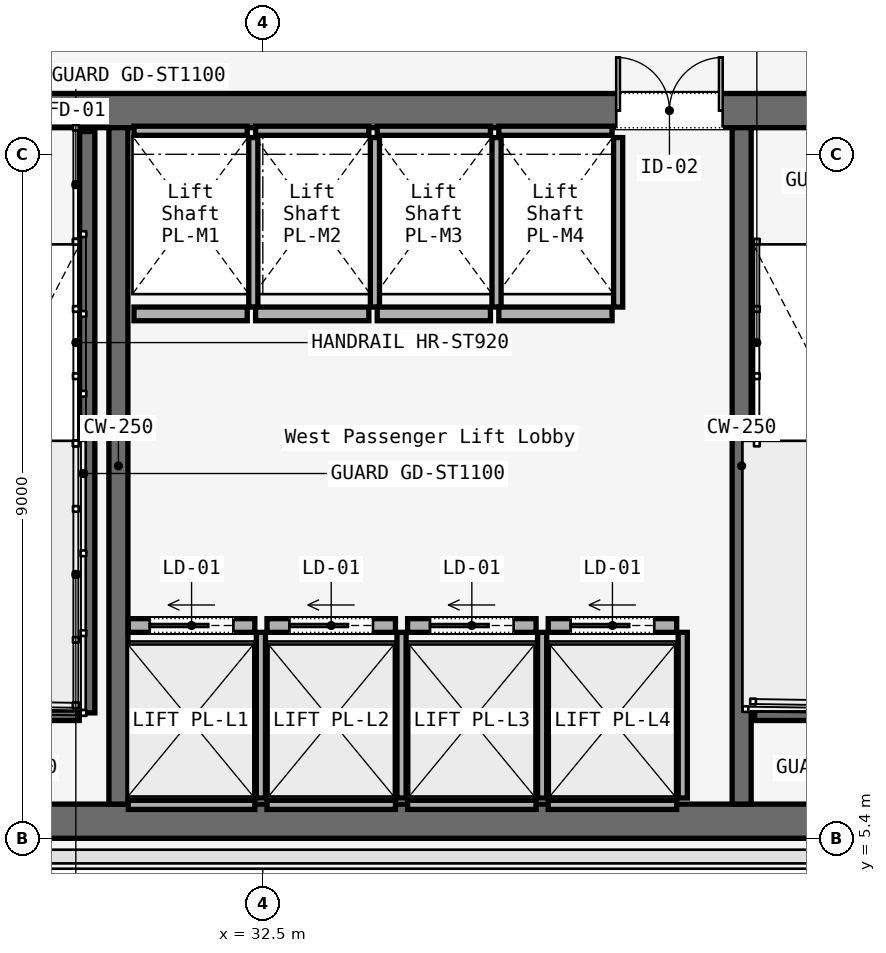
"""IFC4 building model, lengths in metres.
Left out: names, types, materials, properties, quantities, classifications, styles, units other than length and angle.
Written with IfcOpenShell. Run it as: python <this file> out.ifc"""

import sys

from ifc_helpers import new_model, si_unit, direction, frame, frame_2d, origin, place, context, subcontext, project, spatial, rectangle, extrude, element, fill, save


model = new_model("IFC4")
c1 = context("Model", 3, precision=1e-05, world=origin(), true_north=direction((0.0, 1.0)))
c2 = subcontext(c1, "Body", "Model", "MODEL_VIEW")
j1 = project(units=[si_unit("LENGTHUNIT", "METRE"), si_unit("PLANEANGLEUNIT", "RADIAN")], contexts=[c1])
p1 = place(None, origin())
s1 = spatial("IfcSite", under=j1, at=p1, CompositionType="ELEMENT")
p2 = place(p1, origin())
s2 = spatial("IfcBuilding", under=s1, at=p2, CompositionType="ELEMENT")
p3 = place(p2, frame((0.0, 0.0, 81.6)))
s3 = spatial("IfcBuildingStorey", under=s2, at=p3, CompositionType="ELEMENT", Elevation=81.6)
p4 = place(p3, frame((26.45, 14.975, 0.0), z_axis=(0.0, 0.0, 1.0), x_axis=(1.0, 0.0, 0.0)))
e1 = element("IfcWall", 1, at=p4, inside=s3, PredefinedType="SOLIDWALL", context=c2, shape_type="SweptSolid", body=[
    extrude(rectangle(XDim=31.1, YDim=0.45, at=frame_2d((15.55, 0.0))), origin(), (0.0, 0.0, 1.0), 3.58),
])
p5 = place(p4, frame((1.65, 0.0, 0.0)))
e2 = element("IfcOpeningElement", 2, at=p5, cuts=e1, PredefinedType="OPENING", context=c2, shape_type="SweptSolid", body=[
    extrude(rectangle(XDim=1.1, YDim=2.2, at=frame_2d((0.55, 1.1))), frame((0.0, 0.225, 0.0), z_axis=(0.0, -1.0, 0.0), x_axis=(1.0, 0.0, 0.0)), (0.0, 0.0, 1.0), 0.45),
])
p6 = place(p4, frame((13.65, 0.0, 0.0)))
e3 = element("IfcOpeningElement", 3, at=p6, cuts=e1, PredefinedType="OPENING", context=c2, shape_type="SweptSolid", body=[
    extrude(rectangle(XDim=1.1, YDim=2.2, at=frame_2d((0.55, 1.1))), frame((0.0, 0.225, 0.0), z_axis=(0.0, -1.0, 0.0), x_axis=(1.0, 0.0, 0.0)), (0.0, 0.0, 1.0), 0.45),
])
p7 = place(p4, frame((25.55, 0.0, 0.0)))
e4 = element("IfcOpeningElement", 4, at=p7, cuts=e1, PredefinedType="OPENING", context=c2, shape_type="SweptSolid", body=[
    extrude(rectangle(XDim=1.1, YDim=2.2, at=frame_2d((0.55, 1.1))), frame((0.0, 0.225, 0.0), z_axis=(0.0, -1.0, 0.0), x_axis=(1.0, 0.0, 0.0)), (0.0, 0.0, 1.0), 0.45),
])
p8 = place(p4, frame((10.7, 0.0, 0.0)))
e5 = element("IfcOpeningElement", 5, at=p8, cuts=e1, PredefinedType="OPENING", context=c2, shape_type="SweptSolid", body=[
    extrude(rectangle(XDim=1.4, YDim=2.2, at=frame_2d((0.7, 1.1))), frame((0.0, 0.225, 0.0), z_axis=(0.0, -1.0, 0.0), x_axis=(1.0, 0.0, 0.0)), (0.0, 0.0, 1.0), 0.45),
])
p9 = place(p4, frame((19.35, 0.0, 0.0)))
e6 = element("IfcOpeningElement", 6, at=p9, cuts=e1, PredefinedType="OPENING", context=c2, shape_type="SweptSolid", body=[
    extrude(rectangle(XDim=1.1, YDim=2.2, at=frame_2d((0.55, 1.1))), frame((0.0, 0.225, 0.0), z_axis=(0.0, -1.0, 0.0), x_axis=(1.0, 0.0, 0.0)), (0.0, 0.0, 1.0), 0.45),
])
p10 = place(p4, frame((21.4, 0.0, 0.0)))
e7 = element("IfcOpeningElement", 7, at=p10, cuts=e1, PredefinedType="OPENING", context=c2, shape_type="SweptSolid", body=[
    extrude(rectangle(XDim=0.9, YDim=2.1, at=frame_2d((0.45, 1.05))), frame((0.0, 0.225, 0.0), z_axis=(0.0, -1.0, 0.0), x_axis=(1.0, 0.0, 0.0)), (0.0, 0.0, 1.0), 0.45),
])
p11 = place(p4, frame((23.35, 0.0, 0.0)))
e8 = element("IfcOpeningElement", 8, at=p11, cuts=e1, PredefinedType="OPENING", context=c2, shape_type="SweptSolid", body=[
    extrude(rectangle(XDim=1.3, YDim=2.3, at=frame_2d((0.65, 1.15))), frame((0.0, 0.225, 0.0), z_axis=(0.0, -1.0, 0.0), x_axis=(1.0, 0.0, 0.0)), (0.0, 0.0, 1.0), 0.45),
])
p12 = place(p3, frame((26.45, 5.625, 0.0), z_axis=(0.0, 0.0, 1.0), x_axis=(1.0, 0.0, 0.0)))
e9 = element("IfcWall", 9, at=p12, inside=s3, PredefinedType="SOLIDWALL", context=c2, shape_type="SweptSolid", body=[
    extrude(rectangle(XDim=31.1, YDim=0.45, at=frame_2d((15.55, 0.0))), origin(), (0.0, 0.0, 1.0), 3.58),
])
for number, where, z_axis, x_axis in (
    (10, (30.6, 5.85, 0.0), (0.0, 0.0, 1.0), (0.0, 1.0, 0.0)),
    (11, (38.8, 5.85, 0.0), (0.0, 0.0, 1.0), (0.0, 1.0, 0.0)),
):
    element("IfcWall", number, at=place(p3, frame(where, z_axis=z_axis, x_axis=x_axis)), inside=s3, PredefinedType="SOLIDWALL", context=c2, shape_type="SweptSolid", body=[
        extrude(rectangle(XDim=8.9, YDim=0.25, at=frame_2d((4.45, 0.0))), origin(), (0.0, 0.0, 1.0), 3.58),
    ])
p13 = place(p3, frame((30.19, 14.7, 0.0), z_axis=(0.0, 0.0, 1.0), x_axis=(0.0, -1.0, 0.0)))
e12 = element("IfcWall", 12, at=p13, inside=s3, PredefinedType="SOLIDWALL", context=c2, shape_type="SweptSolid", body=[
    extrude(rectangle(XDim=7.65, YDim=0.2, at=frame_2d((3.825, 0.0))), origin(), (0.0, 0.0, 1.0), 3.8),
])
for number, where, z_axis, x_axis in (
    (13, (26.97, 7.05, 0.0), (0.0, 0.0, 1.0), (1.0, 0.0, 0.0)),
    (14, (38.97, 7.05, 0.0), (0.0, 0.0, 1.0), (1.0, 0.0, 0.0)),
):
    element("IfcWall", number, at=place(p3, frame(where, z_axis=z_axis, x_axis=x_axis)), inside=s3, PredefinedType="SOLIDWALL", context=c2, shape_type="SweptSolid", body=[
        extrude(rectangle(XDim=3.115, YDim=0.2, at=frame_2d((1.558, 0.0))), origin(), (0.0, 0.0, 1.0), 3.8),
    ])
p14 = place(p3, frame((30.73, 8.2, 0.0), z_axis=(0.0, 0.0, 1.0), x_axis=(1.0, 0.0, 0.0)))
e15 = element("IfcWall", 15, at=p14, inside=s3, PredefinedType="SOLIDWALL", context=c2, shape_type="SweptSolid", body=[
    extrude(rectangle(XDim=1.665, YDim=0.18, at=frame_2d((0.833, 0.0))), origin(), (0.0, 0.0, 1.0), 2.95),
])
p15 = place(p14, frame((0.282, 0.0, 0.0)))
e16 = element("IfcOpeningElement", 16, at=p15, cuts=e15, PredefinedType="OPENING", context=c2, shape_type="SweptSolid", body=[
    extrude(rectangle(XDim=1.1, YDim=2.2, at=frame_2d((0.55, 1.1))), frame((0.0, 0.09, 0.0), z_axis=(0.0, -1.0, 0.0), x_axis=(1.0, 0.0, 0.0)), (0.0, 0.0, 1.0), 0.18),
])
p16 = place(p3, frame((30.73, 5.84, 0.0), z_axis=(0.0, 0.0, 1.0), x_axis=(1.0, 0.0, 0.0)))
e17 = element("IfcWall", 17, at=p16, inside=s3, PredefinedType="SOLIDWALL", context=c2, shape_type="SweptSolid", body=[
    extrude(rectangle(XDim=1.665, YDim=0.12, at=frame_2d((0.833, 0.0))), origin(), (0.0, 0.0, 1.0), 2.95),
])
p17 = place(p3, frame((32.475, 5.93, 0.0), z_axis=(0.0, 0.0, 1.0), x_axis=(0.0, 1.0, 0.0)))
e18 = element("IfcWall", 18, at=p17, inside=s3, PredefinedType="SOLIDWALL", context=c2, shape_type="SweptSolid", body=[
    extrude(rectangle(XDim=2.18, YDim=0.12, at=frame_2d((1.09, 0.0))), origin(), (0.0, 0.0, 1.0), 2.95),
])
p18 = place(p3, frame((32.555, 8.2, 0.0), z_axis=(0.0, 0.0, 1.0), x_axis=(1.0, 0.0, 0.0)))
e19 = element("IfcWall", 19, at=p18, inside=s3, PredefinedType="SOLIDWALL", context=c2, shape_type="SweptSolid", body=[
    extrude(rectangle(XDim=1.69, YDim=0.18, at=frame_2d((0.845, 0.0))), origin(), (0.0, 0.0, 1.0), 2.95),
])
p19 = place(p18, frame((0.295, 0.0, 0.0)))
e20 = element("IfcOpeningElement", 20, at=p19, cuts=e19, PredefinedType="OPENING", context=c2, shape_type="SweptSolid", body=[
    extrude(rectangle(XDim=1.1, YDim=2.2, at=frame_2d((0.55, 1.1))), frame((0.0, 0.09, 0.0), z_axis=(0.0, -1.0, 0.0), x_axis=(1.0, 0.0, 0.0)), (0.0, 0.0, 1.0), 0.18),
])
p20 = place(p3, frame((32.555, 5.84, 0.0), z_axis=(0.0, 0.0, 1.0), x_axis=(1.0, 0.0, 0.0)))
e21 = element("IfcWall", 21, at=p20, inside=s3, PredefinedType="SOLIDWALL", context=c2, shape_type="SweptSolid", body=[
    extrude(rectangle(XDim=1.69, YDim=0.12, at=frame_2d((0.845, 0.0))), origin(), (0.0, 0.0, 1.0), 2.95),
])
p21 = place(p3, frame((34.325, 5.93, 0.0), z_axis=(0.0, 0.0, 1.0), x_axis=(0.0, 1.0, 0.0)))
e22 = element("IfcWall", 22, at=p21, inside=s3, PredefinedType="SOLIDWALL", context=c2, shape_type="SweptSolid", body=[
    extrude(rectangle(XDim=2.18, YDim=0.12, at=frame_2d((1.09, 0.0))), origin(), (0.0, 0.0, 1.0), 2.95),
])
p22 = place(p3, frame((34.405, 8.2, 0.0), z_axis=(0.0, 0.0, 1.0), x_axis=(1.0, 0.0, 0.0)))
e23 = element("IfcWall", 23, at=p22, inside=s3, PredefinedType="SOLIDWALL", context=c2, shape_type="SweptSolid", body=[
    extrude(rectangle(XDim=1.69, YDim=0.18, at=frame_2d((0.845, 0.0))), origin(), (0.0, 0.0, 1.0), 2.95),
])
p23 = place(p22, frame((0.295, 0.0, 0.0)))
e24 = element("IfcOpeningElement", 24, at=p23, cuts=e23, PredefinedType="OPENING", context=c2, shape_type="SweptSolid", body=[
    extrude(rectangle(XDim=1.1, YDim=2.2, at=frame_2d((0.55, 1.1))), frame((0.0, 0.09, 0.0), z_axis=(0.0, -1.0, 0.0), x_axis=(1.0, 0.0, 0.0)), (0.0, 0.0, 1.0), 0.18),
])
p24 = place(p3, frame((34.405, 5.84, 0.0), z_axis=(0.0, 0.0, 1.0), x_axis=(1.0, 0.0, 0.0)))
e25 = element("IfcWall", 25, at=p24, inside=s3, PredefinedType="SOLIDWALL", context=c2, shape_type="SweptSolid", body=[
    extrude(rectangle(XDim=1.69, YDim=0.12, at=frame_2d((0.845, 0.0))), origin(), (0.0, 0.0, 1.0), 2.95),
])
p25 = place(p3, frame((36.175, 5.93, 0.0), z_axis=(0.0, 0.0, 1.0), x_axis=(0.0, 1.0, 0.0)))
e26 = element("IfcWall", 26, at=p25, inside=s3, PredefinedType="SOLIDWALL", context=c2, shape_type="SweptSolid", body=[
    extrude(rectangle(XDim=2.18, YDim=0.12, at=frame_2d((1.09, 0.0))), origin(), (0.0, 0.0, 1.0), 2.95),
])
p26 = place(p3, frame((36.255, 8.2, 0.0), z_axis=(0.0, 0.0, 1.0), x_axis=(1.0, 0.0, 0.0)))
e27 = element("IfcWall", 27, at=p26, inside=s3, PredefinedType="SOLIDWALL", context=c2, shape_type="SweptSolid", body=[
    extrude(rectangle(XDim=1.69, YDim=0.18, at=frame_2d((0.845, 0.0))), origin(), (0.0, 0.0, 1.0), 2.95),
])
p27 = place(p26, frame((0.295, 0.0, 0.0)))
e28 = element("IfcOpeningElement", 28, at=p27, cuts=e27, PredefinedType="OPENING", context=c2, shape_type="SweptSolid", body=[
    extrude(rectangle(XDim=1.1, YDim=2.2, at=frame_2d((0.55, 1.1))), frame((0.0, 0.09, 0.0), z_axis=(0.0, -1.0, 0.0), x_axis=(1.0, 0.0, 0.0)), (0.0, 0.0, 1.0), 0.18),
])
p28 = place(p3, frame((36.255, 5.84, 0.0), z_axis=(0.0, 0.0, 1.0), x_axis=(1.0, 0.0, 0.0)))
e29 = element("IfcWall", 29, at=p28, inside=s3, PredefinedType="SOLIDWALL", context=c2, shape_type="SweptSolid", body=[
    extrude(rectangle(XDim=1.69, YDim=0.12, at=frame_2d((0.845, 0.0))), origin(), (0.0, 0.0, 1.0), 2.95),
])
p29 = place(p3, frame((38.025, 5.93, 0.0), z_axis=(0.0, 0.0, 1.0), x_axis=(0.0, 1.0, 0.0)))
e30 = element("IfcWall", 30, at=p29, inside=s3, PredefinedType="SOLIDWALL", context=c2, shape_type="SweptSolid", body=[
    extrude(rectangle(XDim=2.18, YDim=0.12, at=frame_2d((1.09, 0.0))), origin(), (0.0, 0.0, 1.0), 2.95),
])
p30 = place(p3, frame((30.805, 12.3, 0.0), z_axis=(0.0, 0.0, 1.0), x_axis=(1.0, 0.0, 0.0)))
e31 = element("IfcWall", 31, at=p30, inside=s3, PredefinedType="SOLIDWALL", context=c2, shape_type="SweptSolid", body=[
    extrude(rectangle(XDim=1.49, YDim=0.18, at=frame_2d((0.745, 0.0))), origin(), (0.0, 0.0, 1.0), 2.95),
])
p31 = place(p3, frame((30.805, 14.71, 0.0), z_axis=(0.0, 0.0, 1.0), x_axis=(1.0, 0.0, 0.0)))
e32 = element("IfcWall", 32, at=p31, inside=s3, PredefinedType="SOLIDWALL", context=c2, shape_type="SweptSolid", body=[
    extrude(rectangle(XDim=1.49, YDim=0.12, at=frame_2d((0.745, 0.0))), origin(), (0.0, 0.0, 1.0), 2.95),
])
p32 = place(p3, frame((32.375, 12.39, 0.0), z_axis=(0.0, 0.0, 1.0), x_axis=(0.0, 1.0, 0.0)))
e33 = element("IfcWall", 33, at=p32, inside=s3, PredefinedType="SOLIDWALL", context=c2, shape_type="SweptSolid", body=[
    extrude(rectangle(XDim=2.23, YDim=0.12, at=frame_2d((1.115, 0.0))), origin(), (0.0, 0.0, 1.0), 2.95),
])
p33 = place(p3, frame((32.405, 12.3, 0.0), z_axis=(0.0, 0.0, 1.0), x_axis=(1.0, 0.0, 0.0)))
e34 = element("IfcWall", 34, at=p33, inside=s3, PredefinedType="SOLIDWALL", context=c2, shape_type="SweptSolid", body=[
    extrude(rectangle(XDim=1.49, YDim=0.18, at=frame_2d((0.745, 0.0))), origin(), (0.0, 0.0, 1.0), 2.95),
])
p34 = place(p3, frame((32.405, 14.71, 0.0), z_axis=(0.0, 0.0, 1.0), x_axis=(1.0, 0.0, 0.0)))
e35 = element("IfcWall", 35, at=p34, inside=s3, PredefinedType="SOLIDWALL", context=c2, shape_type="SweptSolid", body=[
    extrude(rectangle(XDim=1.49, YDim=0.12, at=frame_2d((0.745, 0.0))), origin(), (0.0, 0.0, 1.0), 2.95),
])
p35 = place(p3, frame((33.975, 12.39, 0.0), z_axis=(0.0, 0.0, 1.0), x_axis=(0.0, 1.0, 0.0)))
e36 = element("IfcWall", 36, at=p35, inside=s3, PredefinedType="SOLIDWALL", context=c2, shape_type="SweptSolid", body=[
    extrude(rectangle(XDim=2.23, YDim=0.12, at=frame_2d((1.115, 0.0))), origin(), (0.0, 0.0, 1.0), 2.95),
])
p36 = place(p3, frame((34.005, 12.3, 0.0), z_axis=(0.0, 0.0, 1.0), x_axis=(1.0, 0.0, 0.0)))
e37 = element("IfcWall", 37, at=p36, inside=s3, PredefinedType="SOLIDWALL", context=c2, shape_type="SweptSolid", body=[
    extrude(rectangle(XDim=1.49, YDim=0.18, at=frame_2d((0.745, 0.0))), origin(), (0.0, 0.0, 1.0), 2.95),
])
p37 = place(p3, frame((34.005, 14.71, 0.0), z_axis=(0.0, 0.0, 1.0), x_axis=(1.0, 0.0, 0.0)))
e38 = element("IfcWall", 38, at=p37, inside=s3, PredefinedType="SOLIDWALL", context=c2, shape_type="SweptSolid", body=[
    extrude(rectangle(XDim=1.49, YDim=0.12, at=frame_2d((0.745, 0.0))), origin(), (0.0, 0.0, 1.0), 2.95),
])
p38 = place(p3, frame((35.575, 12.39, 0.0), z_axis=(0.0, 0.0, 1.0), x_axis=(0.0, 1.0, 0.0)))
e39 = element("IfcWall", 39, at=p38, inside=s3, PredefinedType="SOLIDWALL", context=c2, shape_type="SweptSolid", body=[
    extrude(rectangle(XDim=2.23, YDim=0.12, at=frame_2d((1.115, 0.0))), origin(), (0.0, 0.0, 1.0), 2.95),
])
p39 = place(p3, frame((35.605, 12.3, 0.0), z_axis=(0.0, 0.0, 1.0), x_axis=(1.0, 0.0, 0.0)))
e40 = element("IfcWall", 40, at=p39, inside=s3, PredefinedType="SOLIDWALL", context=c2, shape_type="SweptSolid", body=[
    extrude(rectangle(XDim=1.49, YDim=0.18, at=frame_2d((0.745, 0.0))), origin(), (0.0, 0.0, 1.0), 2.95),
])
p40 = place(p3, frame((35.605, 14.71, 0.0), z_axis=(0.0, 0.0, 1.0), x_axis=(1.0, 0.0, 0.0)))
e41 = element("IfcWall", 41, at=p40, inside=s3, PredefinedType="SOLIDWALL", context=c2, shape_type="SweptSolid", body=[
    extrude(rectangle(XDim=1.49, YDim=0.12, at=frame_2d((0.745, 0.0))), origin(), (0.0, 0.0, 1.0), 2.95),
])
p41 = place(p3, frame((37.175, 12.39, 0.0), z_axis=(0.0, 0.0, 1.0), x_axis=(0.0, 1.0, 0.0)))
e42 = element("IfcWall", 42, at=p41, inside=s3, PredefinedType="SOLIDWALL", context=c2, shape_type="SweptSolid", body=[
    extrude(rectangle(XDim=2.23, YDim=0.12, at=frame_2d((1.115, 0.0))), origin(), (0.0, 0.0, 1.0), 2.95),
])
p42 = place(p8, origin())
e43 = element("IfcDoor", 43, at=p42, inside=s3, OperationType="DOUBLE_DOOR_SINGLE_SWING", PredefinedType="DOOR", context=c2, shape_type="SweptSolid", body=[
    extrude(rectangle(XDim=1.4, YDim=2.2, at=frame_2d((0.7, 1.1))), frame((0.0, 0.025, 0.0), z_axis=(0.0, -1.0, 0.0), x_axis=(1.0, 0.0, 0.0)), (0.0, 0.0, 1.0), 0.05),
])
fill(e5, e43)
p43 = place(p15, origin())
e44 = element("IfcDoor", 44, at=p43, inside=s3, OperationType="SLIDING_TO_LEFT", PredefinedType="DOOR", context=c2, shape_type="SweptSolid", body=[
    extrude(rectangle(XDim=1.1, YDim=2.2, at=frame_2d((0.55, 1.1))), frame((0.0, 0.025, 0.0), z_axis=(0.0, -1.0, 0.0), x_axis=(1.0, 0.0, 0.0)), (0.0, 0.0, 1.0), 0.05),
])
fill(e16, e44)
p44 = place(p19, origin())
e45 = element("IfcDoor", 45, at=p44, inside=s3, OperationType="SLIDING_TO_LEFT", PredefinedType="DOOR", context=c2, shape_type="SweptSolid", body=[
    extrude(rectangle(XDim=1.1, YDim=2.2, at=frame_2d((0.55, 1.1))), frame((0.0, 0.025, 0.0), z_axis=(0.0, -1.0, 0.0), x_axis=(1.0, 0.0, 0.0)), (0.0, 0.0, 1.0), 0.05),
])
fill(e20, e45)
p45 = place(p23, origin())
e46 = element("IfcDoor", 46, at=p45, inside=s3, OperationType="SLIDING_TO_LEFT", PredefinedType="DOOR", context=c2, shape_type="SweptSolid", body=[
    extrude(rectangle(XDim=1.1, YDim=2.2, at=frame_2d((0.55, 1.1))), frame((0.0, 0.025, 0.0), z_axis=(0.0, -1.0, 0.0), x_axis=(1.0, 0.0, 0.0)), (0.0, 0.0, 1.0), 0.05),
])
fill(e24, e46)
p46 = place(p27, origin())
e47 = element("IfcDoor", 47, at=p46, inside=s3, OperationType="SLIDING_TO_LEFT", PredefinedType="DOOR", context=c2, shape_type="SweptSolid", body=[
    extrude(rectangle(XDim=1.1, YDim=2.2, at=frame_2d((0.55, 1.1))), frame((0.0, 0.025, 0.0), z_axis=(0.0, -1.0, 0.0), x_axis=(1.0, 0.0, 0.0)), (0.0, 0.0, 1.0), 0.05),
])
fill(e28, e47)
save(model, sys.argv[1])
